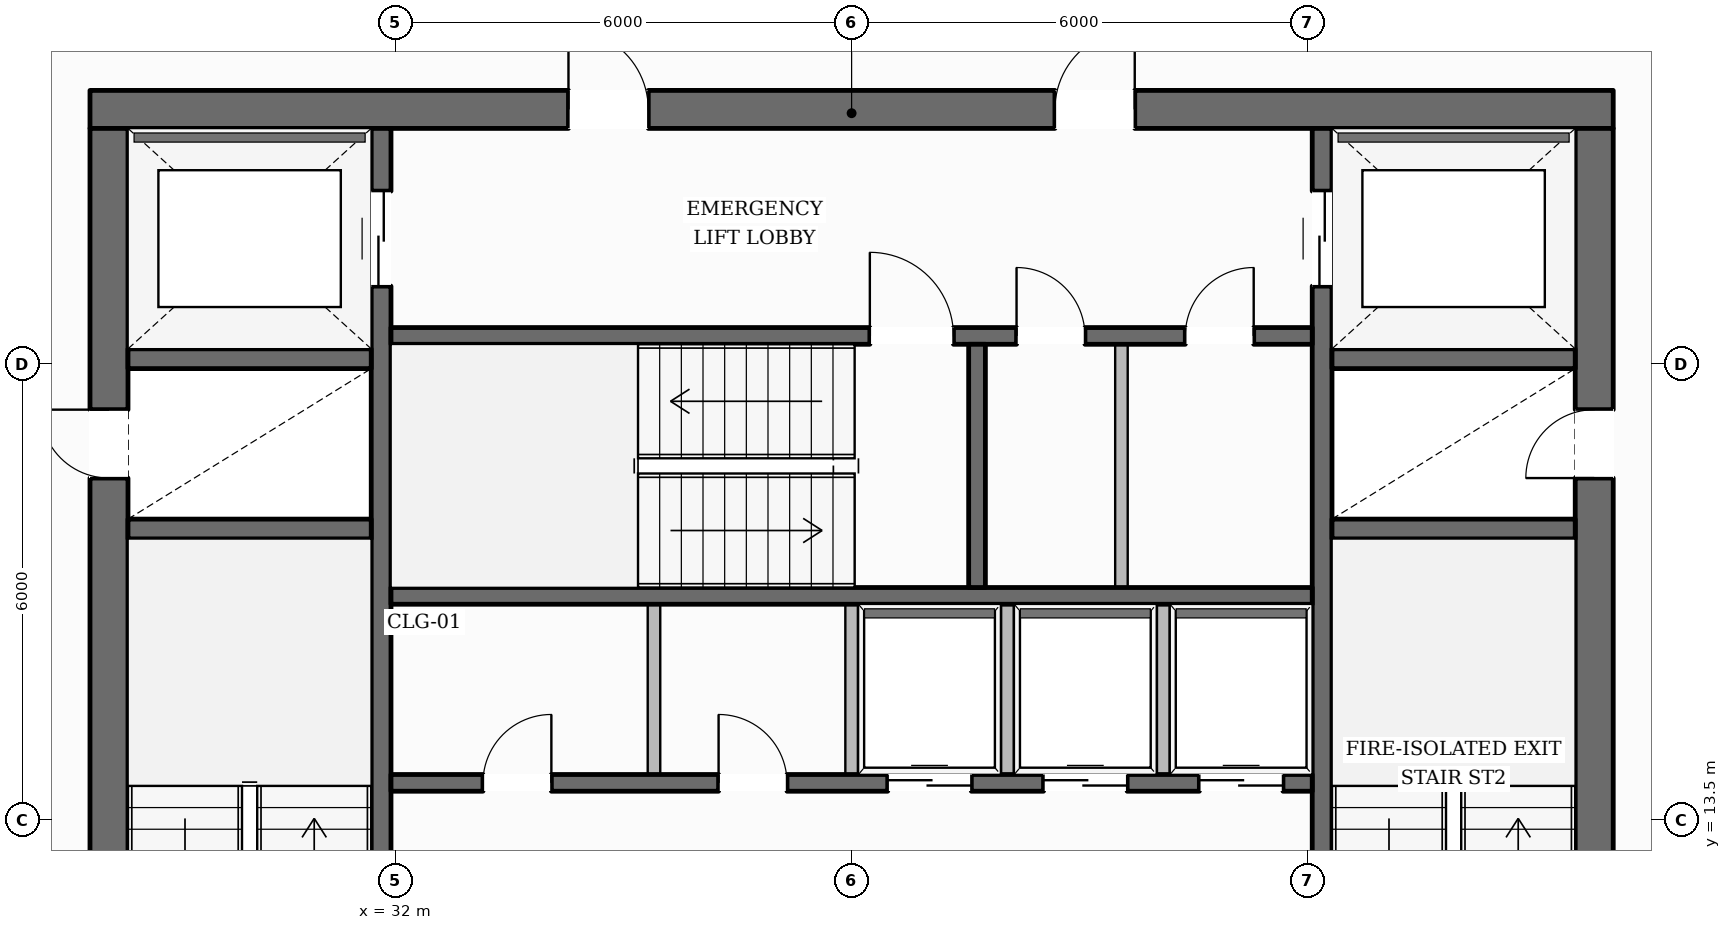
"""IFC4 building model, lengths in metres.
Left out: names, types, materials, properties, quantities, classifications, styles, units other than length and angle.
Written with IfcOpenShell. Run it as: python <this file> out.ifc"""

import sys

from ifc_helpers import new_model, si_unit, direction, frame, frame_2d, origin, place, context, subcontext, project, spatial, rectangle, extrude, element, fill, save


model = new_model("IFC4")
c1 = context("Model", 3, precision=1e-05, world=origin(), true_north=direction((0.0, 1.0)))
c2 = subcontext(c1, "Body", "Model", "MODEL_VIEW")
j1 = project(units=[si_unit("LENGTHUNIT", "METRE"), si_unit("PLANEANGLEUNIT", "RADIAN")], contexts=[c1])
p1 = place(None, origin())
s1 = spatial("IfcSite", under=j1, at=p1, CompositionType="ELEMENT")
p2 = place(p1, origin())
s2 = spatial("IfcBuilding", under=s1, at=p2, CompositionType="ELEMENT")
p3 = place(p2, frame((0.0, 0.0, 108.6)))
s3 = spatial("IfcBuildingStorey", under=s2, at=p3, CompositionType="ELEMENT", Elevation=108.6)
p4 = place(p3, frame((27.98, 22.85, 0.0), z_axis=(0.0, 0.0, 1.0), x_axis=(1.0, 0.0, 0.0)))
e1 = element("IfcWall", 1, at=p4, inside=s3, PredefinedType="SOLIDWALL", context=c2, shape_type="SweptSolid", body=[
    extrude(rectangle(XDim=20.04, YDim=0.5, at=frame_2d((10.02, 0.0))), origin(), (0.0, 0.0, 1.0), 3.6),
])
p5 = place(p4, frame((6.295, 0.0, 0.0)))
e2 = element("IfcOpeningElement", 2, at=p5, cuts=e1, PredefinedType="OPENING", context=c2, shape_type="SweptSolid", body=[
    extrude(rectangle(XDim=1.05, YDim=2.15, at=frame_2d((0.525, 1.075))), frame((0.0, 0.26, 0.0), z_axis=(0.0, -1.0, 0.0), x_axis=(1.0, 0.0, 0.0)), (0.0, 0.0, 1.0), 0.52),
])
p6 = place(p4, frame((12.695, 0.0, 0.0)))
e3 = element("IfcOpeningElement", 3, at=p6, cuts=e1, PredefinedType="OPENING", context=c2, shape_type="SweptSolid", body=[
    extrude(rectangle(XDim=1.05, YDim=2.15, at=frame_2d((0.525, 1.075))), frame((0.0, 0.26, 0.0), z_axis=(0.0, -1.0, 0.0), x_axis=(1.0, 0.0, 0.0)), (0.0, 0.0, 1.0), 0.52),
])
p7 = place(p3, frame((28.23, 9.6, 0.0), z_axis=(0.0, 0.0, 1.0), x_axis=(0.0, 1.0, 0.0)))
e4 = element("IfcWall", 4, at=p7, inside=s3, PredefinedType="SOLIDWALL", context=c2, shape_type="SweptSolid", body=[
    extrude(rectangle(XDim=13.0, YDim=0.5, at=frame_2d((6.5, 0.0))), origin(), (0.0, 0.0, 1.0), 3.6),
])
p8 = place(p7, frame((0.2, 0.0, 0.0)))
e5 = element("IfcOpeningElement", 5, at=p8, cuts=e4, PredefinedType="OPENING", context=c2, shape_type="SweptSolid", body=[
    extrude(rectangle(XDim=1.1, YDim=2.15, at=frame_2d((0.55, 1.075))), frame((0.0, 0.26, 0.0), z_axis=(0.0, -1.0, 0.0), x_axis=(1.0, 0.0, 0.0)), (0.0, 0.0, 1.0), 0.52),
])
p9 = place(p7, frame((8.4, 0.0, 0.0)))
e6 = element("IfcOpeningElement", 6, at=p9, cuts=e4, PredefinedType="OPENING", context=c2, shape_type="SweptSolid", body=[
    extrude(rectangle(XDim=0.9, YDim=2.1, at=frame_2d((0.45, 1.05))), frame((0.0, 0.26, 0.0), z_axis=(0.0, -1.0, 0.0), x_axis=(1.0, 0.0, 0.0)), (0.0, 0.0, 1.0), 0.52),
])
p10 = place(p3, frame((47.77, 9.6, 0.0), z_axis=(0.0, 0.0, 1.0), x_axis=(0.0, 1.0, 0.0)))
e7 = element("IfcWall", 7, at=p10, inside=s3, PredefinedType="SOLIDWALL", context=c2, shape_type="SweptSolid", body=[
    extrude(rectangle(XDim=13.0, YDim=0.5, at=frame_2d((6.5, 0.0))), origin(), (0.0, 0.0, 1.0), 3.6),
])
p11 = place(p10, frame((0.2, 0.0, 0.0)))
e8 = element("IfcOpeningElement", 8, at=p11, cuts=e7, PredefinedType="OPENING", context=c2, shape_type="SweptSolid", body=[
    extrude(rectangle(XDim=1.1, YDim=2.15, at=frame_2d((0.55, 1.075))), frame((0.0, 0.26, 0.0), z_axis=(0.0, -1.0, 0.0), x_axis=(1.0, 0.0, 0.0)), (0.0, 0.0, 1.0), 0.52),
])
p12 = place(p10, frame((8.4, 0.0, 0.0)))
e9 = element("IfcOpeningElement", 9, at=p12, cuts=e7, PredefinedType="OPENING", context=c2, shape_type="SweptSolid", body=[
    extrude(rectangle(XDim=0.9, YDim=2.1, at=frame_2d((0.45, 1.05))), frame((0.0, 0.26, 0.0), z_axis=(0.0, -1.0, 0.0), x_axis=(1.0, 0.0, 0.0)), (0.0, 0.0, 1.0), 0.52),
])
p13 = place(p3, frame((31.81, 9.6, 0.0), z_axis=(0.0, 0.0, 1.0), x_axis=(0.0, 1.0, 0.0)))
e10 = element("IfcWall", 10, at=p13, inside=s3, PredefinedType="SHEAR", context=c2, shape_type="SweptSolid", body=[
    extrude(rectangle(XDim=13.0, YDim=0.26, at=frame_2d((6.5, 0.0))), origin(), (0.0, 0.0, 1.0), 3.6),
])
p14 = place(p13, frame((10.925, 0.0, 0.0)))
e11 = element("IfcOpeningElement", 11, at=p14, cuts=e10, PredefinedType="OPENING", context=c2, shape_type="SweptSolid", body=[
    extrude(rectangle(XDim=1.25, YDim=2.25, at=frame_2d((0.625, 1.125))), frame((0.0, 0.14, 0.0), z_axis=(0.0, -1.0, 0.0), x_axis=(1.0, 0.0, 0.0)), (0.0, 0.0, 1.0), 0.28),
])
p15 = place(p3, frame((44.19, 9.6, 0.0), z_axis=(0.0, 0.0, 1.0), x_axis=(0.0, 1.0, 0.0)))
e12 = element("IfcWall", 12, at=p15, inside=s3, PredefinedType="SHEAR", context=c2, shape_type="SweptSolid", body=[
    extrude(rectangle(XDim=13.0, YDim=0.26, at=frame_2d((6.5, 0.0))), origin(), (0.0, 0.0, 1.0), 3.6),
])
p16 = place(p15, frame((10.925, 0.0, 0.0)))
e13 = element("IfcOpeningElement", 13, at=p16, cuts=e12, PredefinedType="OPENING", context=c2, shape_type="SweptSolid", body=[
    extrude(rectangle(XDim=1.25, YDim=2.25, at=frame_2d((0.625, 1.125))), frame((0.0, 0.14, 0.0), z_axis=(0.0, -1.0, 0.0), x_axis=(1.0, 0.0, 0.0)), (0.0, 0.0, 1.0), 0.28),
])
for number, where, z_axis, x_axis in (
    (14, (28.48, 17.33, 0.0), (0.0, 0.0, 1.0), (1.0, 0.0, 0.0)),
    (15, (28.48, 19.57, 0.0), (0.0, 0.0, 1.0), (1.0, 0.0, 0.0)),
    (16, (44.32, 17.33, 0.0), (0.0, 0.0, 1.0), (1.0, 0.0, 0.0)),
    (17, (44.32, 19.57, 0.0), (0.0, 0.0, 1.0), (1.0, 0.0, 0.0)),
):
    element("IfcWall", number, at=place(p3, frame(where, z_axis=z_axis, x_axis=x_axis)), inside=s3, PredefinedType="SHEAR", context=c2, shape_type="SweptSolid", body=[
        extrude(rectangle(XDim=3.2, YDim=0.26, at=frame_2d((1.6, 0.0))), origin(), (0.0, 0.0, 1.0), 3.6),
    ])
p17 = place(p3, frame((31.94, 19.87, 0.0), z_axis=(0.0, 0.0, 1.0), x_axis=(1.0, 0.0, 0.0)))
e18 = element("IfcWall", 18, at=p17, inside=s3, PredefinedType="SOLIDWALL", context=c2, shape_type="SweptSolid", body=[
    extrude(rectangle(XDim=12.12, YDim=0.22, at=frame_2d((6.06, 0.0))), origin(), (0.0, 0.0, 1.0), 3.6),
])
p18 = place(p17, frame((6.3, 0.0, 0.0)))
e19 = element("IfcOpeningElement", 19, at=p18, cuts=e18, PredefinedType="OPENING", context=c2, shape_type="SweptSolid", body=[
    extrude(rectangle(XDim=1.1, YDim=2.15, at=frame_2d((0.55, 1.075))), frame((0.0, 0.12, 0.0), z_axis=(0.0, -1.0, 0.0), x_axis=(1.0, 0.0, 0.0)), (0.0, 0.0, 1.0), 0.24),
])
p19 = place(p17, frame((8.23, 0.0, 0.0)))
e20 = element("IfcOpeningElement", 20, at=p19, cuts=e18, PredefinedType="OPENING", context=c2, shape_type="SweptSolid", body=[
    extrude(rectangle(XDim=0.9, YDim=2.1, at=frame_2d((0.45, 1.05))), frame((0.0, 0.12, 0.0), z_axis=(0.0, -1.0, 0.0), x_axis=(1.0, 0.0, 0.0)), (0.0, 0.0, 1.0), 0.24),
])
p20 = place(p17, frame((10.45, 0.0, 0.0)))
e21 = element("IfcOpeningElement", 21, at=p20, cuts=e18, PredefinedType="OPENING", context=c2, shape_type="SweptSolid", body=[
    extrude(rectangle(XDim=0.9, YDim=2.1, at=frame_2d((0.45, 1.05))), frame((0.0, 0.12, 0.0), z_axis=(0.0, -1.0, 0.0), x_axis=(1.0, 0.0, 0.0)), (0.0, 0.0, 1.0), 0.24),
])
p21 = place(p3, frame((31.94, 16.45, 0.0), z_axis=(0.0, 0.0, 1.0), x_axis=(1.0, 0.0, 0.0)))
e22 = element("IfcWall", 22, at=p21, inside=s3, PredefinedType="SOLIDWALL", context=c2, shape_type="SweptSolid", body=[
    extrude(rectangle(XDim=12.12, YDim=0.22, at=frame_2d((6.06, 0.0))), origin(), (0.0, 0.0, 1.0), 3.6),
])
p22 = place(p3, frame((39.65, 16.56, 0.0), z_axis=(0.0, 0.0, 1.0), x_axis=(0.0, 1.0, 0.0)))
e23 = element("IfcWall", 23, at=p22, inside=s3, PredefinedType="SOLIDWALL", context=c2, shape_type="SweptSolid", body=[
    extrude(rectangle(XDim=3.2, YDim=0.22, at=frame_2d((1.6, 0.0))), origin(), (0.0, 0.0, 1.0), 3.6),
])
p23 = place(p3, frame((31.94, 13.99, 0.0), z_axis=(0.0, 0.0, 1.0), x_axis=(1.0, 0.0, 0.0)))
e24 = element("IfcWall", 24, at=p23, inside=s3, PredefinedType="SOLIDWALL", context=c2, shape_type="SweptSolid", body=[
    extrude(rectangle(XDim=12.12, YDim=0.22, at=frame_2d((6.06, 0.0))), origin(), (0.0, 0.0, 1.0), 3.6),
])
p24 = place(p23, frame((1.21, 0.0, 0.0)))
e25 = element("IfcOpeningElement", 25, at=p24, cuts=e24, PredefinedType="OPENING", context=c2, shape_type="SweptSolid", body=[
    extrude(rectangle(XDim=0.9, YDim=2.1, at=frame_2d((0.45, 1.05))), frame((0.0, 0.12, 0.0), z_axis=(0.0, -1.0, 0.0), x_axis=(1.0, 0.0, 0.0)), (0.0, 0.0, 1.0), 0.24),
])
p25 = place(p23, frame((4.31, 0.0, 0.0)))
e26 = element("IfcOpeningElement", 26, at=p25, cuts=e24, PredefinedType="OPENING", context=c2, shape_type="SweptSolid", body=[
    extrude(rectangle(XDim=0.9, YDim=2.1, at=frame_2d((0.45, 1.05))), frame((0.0, 0.12, 0.0), z_axis=(0.0, -1.0, 0.0), x_axis=(1.0, 0.0, 0.0)), (0.0, 0.0, 1.0), 0.24),
])
p26 = place(p23, frame((6.535, 0.0, 0.0)))
e27 = element("IfcOpeningElement", 27, at=p26, cuts=e24, PredefinedType="OPENING", context=c2, shape_type="SweptSolid", body=[
    extrude(rectangle(XDim=1.1, YDim=2.2, at=frame_2d((0.55, 1.1))), frame((0.0, 0.12, 0.0), z_axis=(0.0, -1.0, 0.0), x_axis=(1.0, 0.0, 0.0)), (0.0, 0.0, 1.0), 0.24),
])
p27 = place(p23, frame((8.585, 0.0, 0.0)))
e28 = element("IfcOpeningElement", 28, at=p27, cuts=e24, PredefinedType="OPENING", context=c2, shape_type="SweptSolid", body=[
    extrude(rectangle(XDim=1.1, YDim=2.2, at=frame_2d((0.55, 1.1))), frame((0.0, 0.12, 0.0), z_axis=(0.0, -1.0, 0.0), x_axis=(1.0, 0.0, 0.0)), (0.0, 0.0, 1.0), 0.24),
])
p28 = place(p23, frame((10.635, 0.0, 0.0)))
e29 = element("IfcOpeningElement", 29, at=p28, cuts=e24, PredefinedType="OPENING", context=c2, shape_type="SweptSolid", body=[
    extrude(rectangle(XDim=1.1, YDim=2.2, at=frame_2d((0.55, 1.1))), frame((0.0, 0.12, 0.0), z_axis=(0.0, -1.0, 0.0), x_axis=(1.0, 0.0, 0.0)), (0.0, 0.0, 1.0), 0.24),
])
p29 = place(p3, frame((14.155, 13.347, 0.0), z_axis=(0.0, 0.0, 1.0), x_axis=(0.493868426836, 0.869536644986, 0.0)))
e30 = element("IfcWall", 30, at=p29, inside=s3, PredefinedType="STANDARD", context=c2, shape_type="SweptSolid", body=[
    extrude(rectangle(XDim=36.121, YDim=0.38, at=frame_2d((18.061, 0.0))), origin(), (0.0, 0.0, 1.0), 3.059),
])
p30 = place(p29, frame((31.935, 0.0, 0.65)))
e31 = element("IfcOpeningElement", 31, at=p30, cuts=e30, PredefinedType="OPENING", context=c2, shape_type="SweptSolid", body=[
    extrude(rectangle(XDim=1.55, YDim=1.75, at=frame_2d((0.775, 0.875))), frame((0.0, 0.2, 0.0), z_axis=(0.0, -1.0, 0.0), x_axis=(1.0, 0.0, 0.0)), (0.0, 0.0, 1.0), 0.4),
])
p31 = place(p29, frame((26.073, 0.0, 0.65)))
e32 = element("IfcOpeningElement", 32, at=p31, cuts=e30, PredefinedType="OPENING", context=c2, shape_type="SweptSolid", body=[
    extrude(rectangle(XDim=1.55, YDim=1.75, at=frame_2d((0.775, 0.875))), frame((0.0, 0.2, 0.0), z_axis=(0.0, -1.0, 0.0), x_axis=(1.0, 0.0, 0.0)), (0.0, 0.0, 1.0), 0.4),
])
p32 = place(p29, frame((14.352, 0.0, 0.65)))
e33 = element("IfcOpeningElement", 33, at=p32, cuts=e30, PredefinedType="OPENING", context=c2, shape_type="SweptSolid", body=[
    extrude(rectangle(XDim=1.55, YDim=1.75, at=frame_2d((0.775, 0.875))), frame((0.0, 0.2, 0.0), z_axis=(0.0, -1.0, 0.0), x_axis=(1.0, 0.0, 0.0)), (0.0, 0.0, 1.0), 0.4),
])
p33 = place(p29, frame((8.491, 0.0, 0.65)))
e34 = element("IfcOpeningElement", 34, at=p33, cuts=e30, PredefinedType="OPENING", context=c2, shape_type="SweptSolid", body=[
    extrude(rectangle(XDim=1.55, YDim=1.75, at=frame_2d((0.775, 0.875))), frame((0.0, 0.2, 0.0), z_axis=(0.0, -1.0, 0.0), x_axis=(1.0, 0.0, 0.0)), (0.0, 0.0, 1.0), 0.4),
])
p34 = place(p29, frame((2.63, 0.0, 0.65)))
e35 = element("IfcOpeningElement", 35, at=p34, cuts=e30, PredefinedType="OPENING", context=c2, shape_type="SweptSolid", body=[
    extrude(rectangle(XDim=1.55, YDim=1.75, at=frame_2d((0.775, 0.875))), frame((0.0, 0.2, 0.0), z_axis=(0.0, -1.0, 0.0), x_axis=(1.0, 0.0, 0.0)), (0.0, 0.0, 1.0), 0.4),
])
p35 = place(p3, frame((44.12, 44.689, 0.0), z_axis=(0.0, 0.0, 1.0), x_axis=(0.498376840975, -0.866960509124, 0.0)))
e36 = element("IfcWall", 36, at=p35, inside=s3, PredefinedType="STANDARD", context=c2, shape_type="SweptSolid", body=[
    extrude(rectangle(XDim=36.441, YDim=0.38, at=frame_2d((18.22, 0.0))), origin(), (0.0, 0.0, 1.0), 3.059),
])
p36 = place(p35, frame((32.234, 0.0, 0.65)))
e37 = element("IfcOpeningElement", 37, at=p36, cuts=e36, PredefinedType="OPENING", context=c2, shape_type="SweptSolid", body=[
    extrude(rectangle(XDim=1.55, YDim=1.75, at=frame_2d((0.775, 0.875))), frame((0.0, 0.2, 0.0), z_axis=(0.0, -1.0, 0.0), x_axis=(1.0, 0.0, 0.0)), (0.0, 0.0, 1.0), 0.4),
])
p37 = place(p35, frame((26.319, 0.0, 0.65)))
e38 = element("IfcOpeningElement", 38, at=p37, cuts=e36, PredefinedType="OPENING", context=c2, shape_type="SweptSolid", body=[
    extrude(rectangle(XDim=1.55, YDim=1.75, at=frame_2d((0.775, 0.875))), frame((0.0, 0.2, 0.0), z_axis=(0.0, -1.0, 0.0), x_axis=(1.0, 0.0, 0.0)), (0.0, 0.0, 1.0), 0.4),
])
p38 = place(p35, frame((14.489, 0.0, 0.65)))
e39 = element("IfcOpeningElement", 39, at=p38, cuts=e36, PredefinedType="OPENING", context=c2, shape_type="SweptSolid", body=[
    extrude(rectangle(XDim=1.55, YDim=1.75, at=frame_2d((0.775, 0.875))), frame((0.0, 0.2, 0.0), z_axis=(0.0, -1.0, 0.0), x_axis=(1.0, 0.0, 0.0)), (0.0, 0.0, 1.0), 0.4),
])
p39 = place(p35, frame((8.573, 0.0, 0.65)))
e40 = element("IfcOpeningElement", 40, at=p39, cuts=e36, PredefinedType="OPENING", context=c2, shape_type="SweptSolid", body=[
    extrude(rectangle(XDim=1.55, YDim=1.75, at=frame_2d((0.775, 0.875))), frame((0.0, 0.2, 0.0), z_axis=(0.0, -1.0, 0.0), x_axis=(1.0, 0.0, 0.0)), (0.0, 0.0, 1.0), 0.4),
])
p40 = place(p35, frame((2.658, 0.0, 0.65)))
e41 = element("IfcOpeningElement", 41, at=p40, cuts=e36, PredefinedType="OPENING", context=c2, shape_type="SweptSolid", body=[
    extrude(rectangle(XDim=1.55, YDim=1.75, at=frame_2d((0.775, 0.875))), frame((0.0, 0.2, 0.0), z_axis=(0.0, -1.0, 0.0), x_axis=(1.0, 0.0, 0.0)), (0.0, 0.0, 1.0), 0.4),
])
for number, where, z_axis, x_axis in (
    (42, (38.0, 14.1, 0.0), (0.0, 0.0, 1.0), (0.0, 1.0, 0.0)),
    (43, (35.4, 14.1, 0.0), (0.0, 0.0, 1.0), (0.0, 1.0, 0.0)),
    (44, (40.05, 14.1, 0.0), (0.0, 0.0, 1.0), (0.0, 1.0, 0.0)),
    (45, (42.1, 14.1, 0.0), (0.0, 0.0, 1.0), (0.0, 1.0, 0.0)),
):
    element("IfcWall", number, at=place(p3, frame(where, z_axis=z_axis, x_axis=x_axis)), inside=s3, PredefinedType="PARTITIONING", context=c2, shape_type="SweptSolid", body=[
        extrude(rectangle(XDim=2.24, YDim=0.165, at=frame_2d((1.12, 0.0))), origin(), (0.0, 0.0, 1.0), 3.6),
    ])
p41 = place(p3, frame((41.55, 16.56, 0.0), z_axis=(0.0, 0.0, 1.0), x_axis=(0.0, 1.0, 0.0)))
e46 = element("IfcWall", 46, at=p41, inside=s3, PredefinedType="PARTITIONING", context=c2, shape_type="SweptSolid", body=[
    extrude(rectangle(XDim=3.2, YDim=0.165, at=frame_2d((1.6, 0.0))), origin(), (0.0, 0.0, 1.0), 3.6),
])
p42 = place(p18, origin())
e47 = element("IfcDoor", 47, at=p42, inside=s3, OperationType="SINGLE_SWING_LEFT", PredefinedType="DOOR", context=c2, shape_type="SweptSolid", body=[
    extrude(rectangle(XDim=1.1, YDim=2.15, at=frame_2d((0.55, 1.075))), frame((0.0, 0.025, 0.0), z_axis=(0.0, -1.0, 0.0), x_axis=(1.0, 0.0, 0.0)), (0.0, 0.0, 1.0), 0.05),
])
fill(e19, e47)
p43 = place(p9, origin())
e48 = element("IfcDoor", 48, at=p43, inside=s3, OperationType="SINGLE_SWING_RIGHT", PredefinedType="DOOR", context=c2, shape_type="SweptSolid", body=[
    extrude(rectangle(XDim=0.9, YDim=2.1, at=frame_2d((0.45, 1.05))), frame((0.0, 0.025, 0.0), z_axis=(0.0, -1.0, 0.0), x_axis=(1.0, 0.0, 0.0)), (0.0, 0.0, 1.0), 0.05),
])
fill(e6, e48)
p44 = place(p12, origin())
e49 = element("IfcDoor", 49, at=p44, inside=s3, OperationType="SINGLE_SWING_LEFT", PredefinedType="DOOR", context=c2, shape_type="SweptSolid", body=[
    extrude(rectangle(XDim=0.9, YDim=2.1, at=frame_2d((0.45, 1.05))), frame((0.0, 0.025, 0.0), z_axis=(0.0, -1.0, 0.0), x_axis=(1.0, 0.0, 0.0)), (0.0, 0.0, 1.0), 0.05),
])
fill(e9, e49)
p45 = place(p5, origin())
e50 = element("IfcDoor", 50, at=p45, inside=s3, OperationType="SINGLE_SWING_LEFT", PredefinedType="DOOR", context=c2, shape_type="SweptSolid", body=[
    extrude(rectangle(XDim=1.05, YDim=2.15, at=frame_2d((0.525, 1.075))), frame((0.0, 0.025, 0.0), z_axis=(0.0, -1.0, 0.0), x_axis=(1.0, 0.0, 0.0)), (0.0, 0.0, 1.0), 0.05),
])
fill(e2, e50)
p46 = place(p6, origin())
e51 = element("IfcDoor", 51, at=p46, inside=s3, OperationType="SINGLE_SWING_RIGHT", PredefinedType="DOOR", context=c2, shape_type="SweptSolid", body=[
    extrude(rectangle(XDim=1.05, YDim=2.15, at=frame_2d((0.525, 1.075))), frame((0.0, 0.025, 0.0), z_axis=(0.0, -1.0, 0.0), x_axis=(1.0, 0.0, 0.0)), (0.0, 0.0, 1.0), 0.05),
])
fill(e3, e51)
p47 = place(p14, origin())
e52 = element("IfcDoor", 52, at=p47, inside=s3, OperationType="DOUBLE_DOOR_SLIDING", PredefinedType="DOOR", context=c2, shape_type="SweptSolid", body=[
    extrude(rectangle(XDim=1.25, YDim=2.25, at=frame_2d((0.625, 1.125))), frame((0.0, 0.025, 0.0), z_axis=(0.0, -1.0, 0.0), x_axis=(1.0, 0.0, 0.0)), (0.0, 0.0, 1.0), 0.05),
])
fill(e11, e52)
p48 = place(p16, origin())
e53 = element("IfcDoor", 53, at=p48, inside=s3, OperationType="DOUBLE_DOOR_SLIDING", PredefinedType="DOOR", context=c2, shape_type="SweptSolid", body=[
    extrude(rectangle(XDim=1.25, YDim=2.25, at=frame_2d((0.625, 1.125))), frame((0.0, 0.025, 0.0), z_axis=(0.0, -1.0, 0.0), x_axis=(1.0, 0.0, 0.0)), (0.0, 0.0, 1.0), 0.05),
])
fill(e13, e53)
p49 = place(p24, origin())
e54 = element("IfcDoor", 54, at=p49, inside=s3, OperationType="SINGLE_SWING_RIGHT", PredefinedType="DOOR", context=c2, shape_type="SweptSolid", body=[
    extrude(rectangle(XDim=0.9, YDim=2.1, at=frame_2d((0.45, 1.05))), frame((0.0, 0.025, 0.0), z_axis=(0.0, -1.0, 0.0), x_axis=(1.0, 0.0, 0.0)), (0.0, 0.0, 1.0), 0.05),
])
fill(e25, e54)
p50 = place(p25, origin())
e55 = element("IfcDoor", 55, at=p50, inside=s3, OperationType="SINGLE_SWING_LEFT", PredefinedType="DOOR", context=c2, shape_type="SweptSolid", body=[
    extrude(rectangle(XDim=0.9, YDim=2.1, at=frame_2d((0.45, 1.05))), frame((0.0, 0.025, 0.0), z_axis=(0.0, -1.0, 0.0), x_axis=(1.0, 0.0, 0.0)), (0.0, 0.0, 1.0), 0.05),
])
fill(e26, e55)
p51 = place(p26, origin())
e56 = element("IfcDoor", 56, at=p51, inside=s3, OperationType="DOUBLE_DOOR_SLIDING", PredefinedType="DOOR", context=c2, shape_type="SweptSolid", body=[
    extrude(rectangle(XDim=1.1, YDim=2.2, at=frame_2d((0.55, 1.1))), frame((0.0, 0.025, 0.0), z_axis=(0.0, -1.0, 0.0), x_axis=(1.0, 0.0, 0.0)), (0.0, 0.0, 1.0), 0.05),
])
fill(e27, e56)
p52 = place(p27, origin())
e57 = element("IfcDoor", 57, at=p52, inside=s3, OperationType="DOUBLE_DOOR_SLIDING", PredefinedType="DOOR", context=c2, shape_type="SweptSolid", body=[
    extrude(rectangle(XDim=1.1, YDim=2.2, at=frame_2d((0.55, 1.1))), frame((0.0, 0.025, 0.0), z_axis=(0.0, -1.0, 0.0), x_axis=(1.0, 0.0, 0.0)), (0.0, 0.0, 1.0), 0.05),
])
fill(e28, e57)
p53 = place(p28, origin())
e58 = element("IfcDoor", 58, at=p53, inside=s3, OperationType="DOUBLE_DOOR_SLIDING", PredefinedType="DOOR", context=c2, shape_type="SweptSolid", body=[
    extrude(rectangle(XDim=1.1, YDim=2.2, at=frame_2d((0.55, 1.1))), frame((0.0, 0.025, 0.0), z_axis=(0.0, -1.0, 0.0), x_axis=(1.0, 0.0, 0.0)), (0.0, 0.0, 1.0), 0.05),
])
fill(e29, e58)
p54 = place(p19, origin())
e59 = element("IfcDoor", 59, at=p54, inside=s3, OperationType="SINGLE_SWING_LEFT", PredefinedType="DOOR", context=c2, shape_type="SweptSolid", body=[
    extrude(rectangle(XDim=0.9, YDim=2.1, at=frame_2d((0.45, 1.05))), frame((0.0, 0.025, 0.0), z_axis=(0.0, -1.0, 0.0), x_axis=(1.0, 0.0, 0.0)), (0.0, 0.0, 1.0), 0.05),
])
fill(e20, e59)
p55 = place(p20, origin())
e60 = element("IfcDoor", 60, at=p55, inside=s3, OperationType="SINGLE_SWING_RIGHT", PredefinedType="DOOR", context=c2, shape_type="SweptSolid", body=[
    extrude(rectangle(XDim=0.9, YDim=2.1, at=frame_2d((0.45, 1.05))), frame((0.0, 0.025, 0.0), z_axis=(0.0, -1.0, 0.0), x_axis=(1.0, 0.0, 0.0)), (0.0, 0.0, 1.0), 0.05),
])
fill(e21, e60)
save(model, sys.argv[1])
